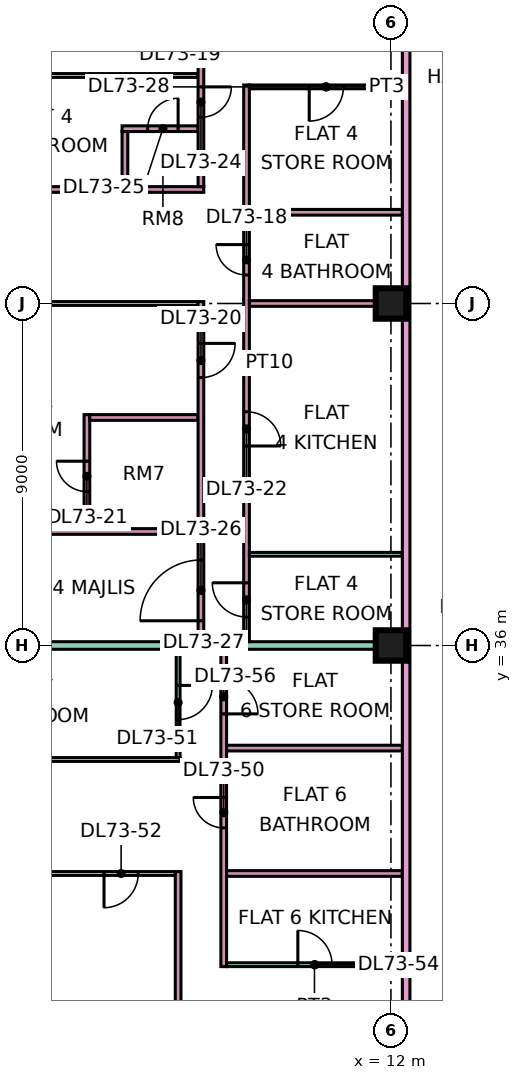
"""IFC4 building model, lengths in metres.
Left out: names, types, materials, properties, quantities, classifications, styles, units other than length and angle.
Written with IfcOpenShell. Run it as: python <this file> out.ifc"""

import sys

from ifc_helpers import new_model, si_unit, direction, frame, frame_2d, origin, origin_2d, place, context, subcontext, project, spatial, rectangle, extrude, element, fill, save


model = new_model("IFC4")
c1 = context("Model", 3, precision=1e-05, world=origin(), true_north=direction((0.0, 1.0)))
c2 = subcontext(c1, "Body", "Model", "MODEL_VIEW")
j1 = project(units=[si_unit("LENGTHUNIT", "METRE"), si_unit("PLANEANGLEUNIT", "RADIAN")], contexts=[c1])
p1 = place(None, origin())
s1 = spatial("IfcSite", under=j1, at=p1, CompositionType="ELEMENT")
p2 = place(p1, origin())
s2 = spatial("IfcBuilding", under=s1, at=p2, CompositionType="ELEMENT")
p3 = place(p2, frame((0.0, 0.0, 310.9)))
s3 = spatial("IfcBuildingStorey", under=s2, at=p3, CompositionType="ELEMENT", Elevation=310.9)
for number, where, z_axis, x_axis in (
    (1, (12.0, 36.0, 0.0), (0.0, 0.0, 1.0), (1.0, 0.0, 0.0)),
    (2, (12.0, 45.0, 0.0), (0.0, 0.0, 1.0), (1.0, 0.0, 0.0)),
):
    element("IfcColumn", number, at=place(p3, frame(where, z_axis=z_axis, x_axis=x_axis)), inside=s3, PredefinedType="COLUMN", context=c2, shape_type="SweptSolid", body=[
        extrude(rectangle(XDim=0.8, YDim=0.8, at=origin_2d()), origin(), (0.0, 0.0, 1.0), 3.75),
    ])
p4 = place(p3, frame((-1.351, 51.0, 0.0), z_axis=(0.0, 0.0, 1.0), x_axis=(1.0, 0.0, 0.0)))
e3 = element("IfcWall", 3, at=p4, inside=s3, PredefinedType="PARTITIONING", context=c2, shape_type="SweptSolid", body=[
    extrude(rectangle(XDim=8.276, YDim=0.1, at=frame_2d((4.138, 0.0))), origin(), (0.0, 0.0, 1.0), 3.35),
])
p5 = place(p3, frame((-1.35, 30.0, 0.0), z_axis=(0.0, 0.0, 1.0), x_axis=(1.0, 0.0, 0.0)))
e4 = element("IfcWall", 4, at=p5, inside=s3, PredefinedType="PARTITIONING", context=c2, shape_type="SweptSolid", body=[
    extrude(rectangle(XDim=7.675, YDim=0.1, at=frame_2d((3.837, 0.0))), origin(), (0.0, 0.0, 1.0), 3.35),
])
p6 = place(p5, frame((5.8, 0.0, 0.0)))
e5 = element("IfcOpeningElement", 5, at=p6, cuts=e4, PredefinedType="OPENING", context=c2, shape_type="SweptSolid", body=[
    extrude(rectangle(XDim=0.9, YDim=2.1, at=frame_2d((0.45, 1.05))), frame((0.0, 0.06, 0.0), z_axis=(0.0, -1.0, 0.0), x_axis=(1.0, 0.0, 0.0)), (0.0, 0.0, 1.0), 0.12),
])
p7 = place(p3, frame((-1.35, 33.0, 0.0), z_axis=(0.0, 0.0, 1.0), x_axis=(1.0, 0.0, 0.0)))
e6 = element("IfcWall", 6, at=p7, inside=s3, PredefinedType="PARTITIONING", context=c2, shape_type="SweptSolid", body=[
    extrude(rectangle(XDim=7.8, YDim=0.1, at=frame_2d((3.9, 0.0))), origin(), (0.0, 0.0, 1.0), 3.35),
])
p8 = place(p3, frame((0.0, 36.0, 0.0), z_axis=(0.0, 0.0, 1.0), x_axis=(1.0, 0.0, 0.0)))
e7 = element("IfcWall", 7, at=p8, inside=s3, PredefinedType="PARTITIONING", context=c2, shape_type="SweptSolid", body=[
    extrude(rectangle(XDim=12.3, YDim=0.2, at=frame_2d((6.15, 0.0))), origin(), (0.0, 0.0, 1.0), 3.35),
])
p9 = place(p3, frame((0.0, 48.0, 0.0), z_axis=(0.0, 0.0, 1.0), x_axis=(1.0, 0.0, 0.0)))
e8 = element("IfcWall", 8, at=p9, inside=s3, PredefinedType="PARTITIONING", context=c2, shape_type="SweptSolid", body=[
    extrude(rectangle(XDim=7.075, YDim=0.15, at=frame_2d((3.538, 0.0))), origin(), (0.0, 0.0, 1.0), 3.35),
])
p10 = place(p3, frame((0.074, 39.0, 0.0), z_axis=(0.0, 0.0, 1.0), x_axis=(1.0, 0.0, 0.0)))
e9 = element("IfcWall", 9, at=p10, inside=s3, PredefinedType="PARTITIONING", context=c2, shape_type="SweptSolid", body=[
    extrude(rectangle(XDim=6.851, YDim=0.15, at=frame_2d((3.426, 0.0))), origin(), (0.0, 0.0, 1.0), 3.35),
])
p11 = place(p3, frame((0.074, 45.0, 0.0), z_axis=(0.0, 0.0, 1.0), x_axis=(1.0, 0.0, 0.0)))
e10 = element("IfcWall", 10, at=p11, inside=s3, PredefinedType="PARTITIONING", context=c2, shape_type="SweptSolid", body=[
    extrude(rectangle(XDim=6.851, YDim=0.1, at=frame_2d((3.426, 0.0))), origin(), (0.0, 0.0, 1.0), 3.35),
])
p12 = place(p3, frame((4.0, 39.075, 0.0), z_axis=(0.0, 0.0, 1.0), x_axis=(0.0, 1.0, 0.0)))
e11 = element("IfcWall", 11, at=p12, inside=s3, PredefinedType="PARTITIONING", context=c2, shape_type="SweptSolid", body=[
    extrude(rectangle(XDim=3.0, YDim=0.15, at=frame_2d((1.5, 0.0))), origin(), (0.0, 0.0, 1.0), 3.35),
])
p13 = place(p12, frame((0.975, 0.0, 0.0)))
e12 = element("IfcOpeningElement", 12, at=p13, cuts=e11, PredefinedType="OPENING", context=c2, shape_type="SweptSolid", body=[
    extrude(rectangle(XDim=0.8, YDim=2.1, at=frame_2d((0.4, 1.05))), frame((0.0, 0.085, 0.0), z_axis=(0.0, -1.0, 0.0), x_axis=(1.0, 0.0, 0.0)), (0.0, 0.0, 1.0), 0.17),
])
p14 = place(p3, frame((4.075, 42.0, 0.0), z_axis=(0.0, 0.0, 1.0), x_axis=(1.0, 0.0, 0.0)))
e13 = element("IfcWall", 13, at=p14, inside=s3, PredefinedType="PARTITIONING", context=c2, shape_type="SweptSolid", body=[
    extrude(rectangle(XDim=2.85, YDim=0.15, at=frame_2d((1.425, 0.0))), origin(), (0.0, 0.0, 1.0), 3.35),
])
p15 = place(p3, frame((4.925, 49.6, 0.0), z_axis=(0.0, 0.0, 1.0), x_axis=(1.0, 0.0, 0.0)))
e14 = element("IfcWall", 14, at=p15, inside=s3, PredefinedType="PARTITIONING", context=c2, shape_type="SweptSolid", body=[
    extrude(rectangle(XDim=2.0, YDim=0.15, at=frame_2d((1.0, 0.0))), origin(), (0.0, 0.0, 1.0), 3.35),
])
p16 = place(p15, frame((0.675, 0.0, 0.0)))
e15 = element("IfcOpeningElement", 15, at=p16, cuts=e14, PredefinedType="OPENING", context=c2, shape_type="SweptSolid", body=[
    extrude(rectangle(XDim=0.8, YDim=2.1, at=frame_2d((0.4, 1.05))), frame((0.0, 0.085, 0.0), z_axis=(0.0, -1.0, 0.0), x_axis=(1.0, 0.0, 0.0)), (0.0, 0.0, 1.0), 0.17),
])
p17 = place(p3, frame((5.0, 48.075, 0.0), z_axis=(0.0, 0.0, 1.0), x_axis=(0.0, 1.0, 0.0)))
e16 = element("IfcWall", 16, at=p17, inside=s3, PredefinedType="PARTITIONING", context=c2, shape_type="SweptSolid", body=[
    extrude(rectangle(XDim=1.45, YDim=0.15, at=frame_2d((0.725, 0.0))), origin(), (0.0, 0.0, 1.0), 3.35),
])
p18 = place(p3, frame((6.4, 22.5, 0.0), z_axis=(0.0, 0.0, 1.0), x_axis=(0.0, 1.0, 0.0)))
e17 = element("IfcWall", 17, at=p18, inside=s3, PredefinedType="PARTITIONING", context=c2, shape_type="SweptSolid", body=[
    extrude(rectangle(XDim=7.55, YDim=0.15, at=frame_2d((3.775, 0.0))), origin(), (0.0, 0.0, 1.0), 3.35),
])
p19 = place(p3, frame((6.4, 33.05, 0.0), z_axis=(0.0, 0.0, 1.0), x_axis=(0.0, 1.0, 0.0)))
e18 = element("IfcWall", 18, at=p19, inside=s3, PredefinedType="PARTITIONING", context=c2, shape_type="SweptSolid", body=[
    extrude(rectangle(XDim=2.85, YDim=0.1, at=frame_2d((1.425, 0.0))), origin(), (0.0, 0.0, 1.0), 3.35),
])
p20 = place(p19, frame((1.0, 0.0, 0.0)))
e19 = element("IfcOpeningElement", 19, at=p20, cuts=e18, PredefinedType="OPENING", context=c2, shape_type="SweptSolid", body=[
    extrude(rectangle(XDim=0.9, YDim=2.1, at=frame_2d((0.45, 1.05))), frame((0.0, 0.06, 0.0), z_axis=(0.0, -1.0, 0.0), x_axis=(1.0, 0.0, 0.0)), (0.0, 0.0, 1.0), 0.12),
])
p21 = place(p3, frame((7.0, 36.1, 0.0), z_axis=(0.0, 0.0, 1.0), x_axis=(0.0, 1.0, 0.0)))
e20 = element("IfcWall", 20, at=p21, inside=s3, PredefinedType="PARTITIONING", context=c2, shape_type="SweptSolid", body=[
    extrude(rectangle(XDim=8.95, YDim=0.15, at=frame_2d((4.475, 0.0))), origin(), (0.0, 0.0, 1.0), 3.35),
])
p22 = place(p21, frame((6.95, 0.0, 0.0)))
e21 = element("IfcOpeningElement", 21, at=p22, cuts=e20, PredefinedType="OPENING", context=c2, shape_type="SweptSolid", body=[
    extrude(rectangle(XDim=0.9, YDim=2.1, at=frame_2d((0.45, 1.05))), frame((0.0, 0.085, 0.0), z_axis=(0.0, -1.0, 0.0), x_axis=(1.0, 0.0, 0.0)), (0.0, 0.0, 1.0), 0.17),
])
p23 = place(p21, frame((0.55, 0.0, 0.0)))
e22 = element("IfcOpeningElement", 22, at=p23, cuts=e20, PredefinedType="OPENING", context=c2, shape_type="SweptSolid", body=[
    extrude(rectangle(XDim=1.6, YDim=2.1, at=frame_2d((0.8, 1.05))), frame((0.0, 0.085, 0.0), z_axis=(0.0, -1.0, 0.0), x_axis=(1.0, 0.0, 0.0)), (0.0, 0.0, 1.0), 0.17),
])
p24 = place(p3, frame((7.0, 48.075, 0.0), z_axis=(0.0, 0.0, 1.0), x_axis=(0.0, 1.0, 0.0)))
e23 = element("IfcWall", 23, at=p24, inside=s3, PredefinedType="PARTITIONING", context=c2, shape_type="SweptSolid", body=[
    extrude(rectangle(XDim=7.275, YDim=0.15, at=frame_2d((3.638, 0.0))), origin(), (0.0, 0.0, 1.0), 3.35),
])
p25 = place(p24, frame((3.975, 0.0, 0.0)))
e24 = element("IfcOpeningElement", 24, at=p25, cuts=e23, PredefinedType="OPENING", context=c2, shape_type="SweptSolid", body=[
    extrude(rectangle(XDim=0.9, YDim=2.1, at=frame_2d((0.45, 1.05))), frame((0.0, 0.085, 0.0), z_axis=(0.0, -1.0, 0.0), x_axis=(1.0, 0.0, 0.0)), (0.0, 0.0, 1.0), 0.17),
])
p26 = place(p24, frame((1.825, 0.0, 0.0)))
e25 = element("IfcOpeningElement", 25, at=p26, cuts=e23, PredefinedType="OPENING", context=c2, shape_type="SweptSolid", body=[
    extrude(rectangle(XDim=0.8, YDim=2.1, at=frame_2d((0.4, 1.05))), frame((0.0, 0.085, 0.0), z_axis=(0.0, -1.0, 0.0), x_axis=(1.0, 0.0, 0.0)), (0.0, 0.0, 1.0), 0.17),
])
p27 = place(p3, frame((7.6, 27.55, 0.0), z_axis=(0.0, 0.0, 1.0), x_axis=(0.0, 1.0, 0.0)))
e26 = element("IfcWall", 26, at=p27, inside=s3, PredefinedType="PARTITIONING", context=c2, shape_type="SweptSolid", body=[
    extrude(rectangle(XDim=8.35, YDim=0.15, at=frame_2d((4.175, 0.0))), origin(), (0.0, 0.0, 1.0), 3.35),
])
p28 = place(p27, frame((3.65, 0.0, 0.0)))
e27 = element("IfcOpeningElement", 27, at=p28, cuts=e26, PredefinedType="OPENING", context=c2, shape_type="SweptSolid", body=[
    extrude(rectangle(XDim=0.8, YDim=2.1, at=frame_2d((0.4, 1.05))), frame((0.0, 0.085, 0.0), z_axis=(0.0, -1.0, 0.0), x_axis=(1.0, 0.0, 0.0)), (0.0, 0.0, 1.0), 0.17),
])
p29 = place(p27, frame((6.65, 0.0, 0.0)))
e28 = element("IfcOpeningElement", 28, at=p29, cuts=e26, PredefinedType="OPENING", context=c2, shape_type="SweptSolid", body=[
    extrude(rectangle(XDim=0.9, YDim=2.1, at=frame_2d((0.45, 1.05))), frame((0.0, 0.085, 0.0), z_axis=(0.0, -1.0, 0.0), x_axis=(1.0, 0.0, 0.0)), (0.0, 0.0, 1.0), 0.17),
])
p30 = place(p3, frame((7.675, 27.6, 0.0), z_axis=(0.0, 0.0, 1.0), x_axis=(1.0, 0.0, 0.0)))
e29 = element("IfcWall", 29, at=p30, inside=s3, PredefinedType="PARTITIONING", context=c2, shape_type="SweptSolid", body=[
    extrude(rectangle(XDim=4.625, YDim=0.1, at=frame_2d((2.312, 0.0))), origin(), (0.0, 0.0, 1.0), 3.35),
])
p31 = place(p30, frame((1.875, 0.0, 0.0)))
e30 = element("IfcOpeningElement", 30, at=p31, cuts=e29, PredefinedType="OPENING", context=c2, shape_type="SweptSolid", body=[
    extrude(rectangle(XDim=0.9, YDim=2.1, at=frame_2d((0.45, 1.05))), frame((0.0, 0.06, 0.0), z_axis=(0.0, -1.0, 0.0), x_axis=(1.0, 0.0, 0.0)), (0.0, 0.0, 1.0), 0.12),
])
for number, where, z_axis, x_axis in (
    (31, (7.675, 30.0, 0.0), (0.0, 0.0, 1.0), (1.0, 0.0, 0.0)),
    (32, (7.675, 33.3, 0.0), (0.0, 0.0, 1.0), (1.0, 0.0, 0.0)),
):
    element("IfcWall", number, at=place(p3, frame(where, z_axis=z_axis, x_axis=x_axis)), inside=s3, PredefinedType="PARTITIONING", context=c2, shape_type="SweptSolid", body=[
        extrude(rectangle(XDim=4.625, YDim=0.15, at=frame_2d((2.312, 0.0))), origin(), (0.0, 0.0, 1.0), 3.35),
    ])
p32 = place(p3, frame((8.2, 36.1, 0.0), z_axis=(0.0, 0.0, 1.0), x_axis=(0.0, 1.0, 0.0)))
e33 = element("IfcWall", 33, at=p32, inside=s3, PredefinedType="PARTITIONING", context=c2, shape_type="SweptSolid", body=[
    extrude(rectangle(XDim=14.65, YDim=0.15, at=frame_2d((7.325, 0.0))), origin(), (0.0, 0.0, 1.0), 3.35),
])
p33 = place(p32, frame((9.65, 0.0, 0.0)))
e34 = element("IfcOpeningElement", 34, at=p33, cuts=e33, PredefinedType="OPENING", context=c2, shape_type="SweptSolid", body=[
    extrude(rectangle(XDim=0.8, YDim=2.1, at=frame_2d((0.4, 1.05))), frame((0.0, 0.085, 0.0), z_axis=(0.0, -1.0, 0.0), x_axis=(1.0, 0.0, 0.0)), (0.0, 0.0, 1.0), 0.17),
])
p34 = place(p32, frame((5.15, 0.0, 0.0)))
e35 = element("IfcOpeningElement", 35, at=p34, cuts=e33, PredefinedType="OPENING", context=c2, shape_type="SweptSolid", body=[
    extrude(rectangle(XDim=0.9, YDim=2.1, at=frame_2d((0.45, 1.05))), frame((0.0, 0.085, 0.0), z_axis=(0.0, -1.0, 0.0), x_axis=(1.0, 0.0, 0.0)), (0.0, 0.0, 1.0), 0.17),
])
p35 = place(p32, frame((0.65, 0.0, 0.0)))
e36 = element("IfcOpeningElement", 36, at=p35, cuts=e33, PredefinedType="OPENING", context=c2, shape_type="SweptSolid", body=[
    extrude(rectangle(XDim=0.9, YDim=2.1, at=frame_2d((0.45, 1.05))), frame((0.0, 0.085, 0.0), z_axis=(0.0, -1.0, 0.0), x_axis=(1.0, 0.0, 0.0)), (0.0, 0.0, 1.0), 0.17),
])
p36 = place(p3, frame((8.275, 38.4, 0.0), z_axis=(0.0, 0.0, 1.0), x_axis=(1.0, 0.0, 0.0)))
e37 = element("IfcWall", 37, at=p36, inside=s3, PredefinedType="PARTITIONING", context=c2, shape_type="SweptSolid", body=[
    extrude(rectangle(XDim=4.025, YDim=0.1, at=frame_2d((2.013, 0.0))), origin(), (0.0, 0.0, 1.0), 3.35),
])
for number, where, z_axis, x_axis in (
    (38, (8.275, 45.0, 0.0), (0.0, 0.0, 1.0), (1.0, 0.0, 0.0)),
    (39, (8.275, 47.4, 0.0), (0.0, 0.0, 1.0), (1.0, 0.0, 0.0)),
):
    element("IfcWall", number, at=place(p3, frame(where, z_axis=z_axis, x_axis=x_axis)), inside=s3, PredefinedType="PARTITIONING", context=c2, shape_type="SweptSolid", body=[
        extrude(rectangle(XDim=4.025, YDim=0.15, at=frame_2d((2.013, 0.0))), origin(), (0.0, 0.0, 1.0), 3.35),
    ])
p37 = place(p3, frame((8.275, 50.7, 0.0), z_axis=(0.0, 0.0, 1.0), x_axis=(1.0, 0.0, 0.0)))
e40 = element("IfcWall", 40, at=p37, inside=s3, PredefinedType="PARTITIONING", context=c2, shape_type="SweptSolid", body=[
    extrude(rectangle(XDim=4.025, YDim=0.1, at=frame_2d((2.013, 0.0))), origin(), (0.0, 0.0, 1.0), 3.35),
])
p38 = place(p37, frame((1.575, 0.0, 0.0)))
e41 = element("IfcOpeningElement", 41, at=p38, cuts=e40, PredefinedType="OPENING", context=c2, shape_type="SweptSolid", body=[
    extrude(rectangle(XDim=0.9, YDim=2.1, at=frame_2d((0.45, 1.05))), frame((0.0, 0.06, 0.0), z_axis=(0.0, -1.0, 0.0), x_axis=(1.0, 0.0, 0.0)), (0.0, 0.0, 1.0), 0.12),
])
p39 = place(p3, frame((12.4, 20.0, 0.0), z_axis=(0.0, 0.0, 1.0), x_axis=(0.0, 1.0, 0.0)))
e42 = element("IfcWall", 42, at=p39, inside=s3, PredefinedType="PARTITIONING", context=c2, shape_type="SweptSolid", body=[
    extrude(rectangle(XDim=33.926, YDim=0.2, at=frame_2d((16.963, 0.0))), origin(), (0.0, 0.0, 1.0), 3.35),
])
p40 = place(p39, frame((31.8, 0.0, 0.0)))
e43 = element("IfcOpeningElement", 43, at=p40, cuts=e42, PredefinedType="OPENING", context=c2, shape_type="SweptSolid", body=[
    extrude(rectangle(XDim=1.0, YDim=2.1, at=frame_2d((0.5, 1.05))), frame((0.0, 0.11, 0.0), z_axis=(0.0, -1.0, 0.0), x_axis=(1.0, 0.0, 0.0)), (0.0, 0.0, 1.0), 0.22),
])
p41 = place(p39, frame((0.6, 0.0, 0.0)))
e44 = element("IfcOpeningElement", 44, at=p41, cuts=e42, PredefinedType="OPENING", context=c2, shape_type="SweptSolid", body=[
    extrude(rectangle(XDim=1.2, YDim=2.1, at=frame_2d((0.6, 1.05))), frame((0.0, 0.11, 0.0), z_axis=(0.0, -1.0, 0.0), x_axis=(1.0, 0.0, 0.0)), (0.0, 0.0, 1.0), 0.22),
])
p42 = place(p39, frame((4.5, 0.0, 0.0)))
e45 = element("IfcOpeningElement", 45, at=p42, cuts=e42, PredefinedType="OPENING", context=c2, shape_type="SweptSolid", body=[
    extrude(rectangle(XDim=1.0, YDim=2.1, at=frame_2d((0.5, 1.05))), frame((0.0, 0.11, 0.0), z_axis=(0.0, -1.0, 0.0), x_axis=(1.0, 0.0, 0.0)), (0.0, 0.0, 1.0), 0.22),
])
p43 = place(p33, frame((0.8, 0.0, 0.0), z_axis=(0.0, 0.0, 1.0), x_axis=(-1.0, 0.0, 0.0)))
e46 = element("IfcDoor", 46, at=p43, inside=s3, OperationType="SINGLE_SWING_RIGHT", PredefinedType="DOOR", context=c2, shape_type="SweptSolid", body=[
    extrude(rectangle(XDim=0.8, YDim=2.1, at=frame_2d((0.4, 1.05))), frame((0.0, 0.025, 0.0), z_axis=(0.0, -1.0, 0.0), x_axis=(1.0, 0.0, 0.0)), (0.0, 0.0, 1.0), 0.05),
])
fill(e34, e46)
p44 = place(p22, origin())
e47 = element("IfcDoor", 47, at=p44, inside=s3, OperationType="SINGLE_SWING_RIGHT", PredefinedType="DOOR", context=c2, shape_type="SweptSolid", body=[
    extrude(rectangle(XDim=0.9, YDim=2.1, at=frame_2d((0.45, 1.05))), frame((0.0, 0.025, 0.0), z_axis=(0.0, -1.0, 0.0), x_axis=(1.0, 0.0, 0.0)), (0.0, 0.0, 1.0), 0.05),
])
fill(e21, e47)
p45 = place(p13, frame((0.8, 0.0, 0.0), z_axis=(0.0, 0.0, 1.0), x_axis=(-1.0, 0.0, 0.0)))
e48 = element("IfcDoor", 48, at=p45, inside=s3, OperationType="SINGLE_SWING_RIGHT", PredefinedType="DOOR", context=c2, shape_type="SweptSolid", body=[
    extrude(rectangle(XDim=0.8, YDim=2.1, at=frame_2d((0.4, 1.05))), frame((0.0, 0.025, 0.0), z_axis=(0.0, -1.0, 0.0), x_axis=(1.0, 0.0, 0.0)), (0.0, 0.0, 1.0), 0.05),
])
fill(e12, e48)
p46 = place(p34, frame((0.9, 0.0, 0.0), z_axis=(0.0, 0.0, 1.0), x_axis=(-1.0, 0.0, 0.0)))
e49 = element("IfcDoor", 49, at=p46, inside=s3, OperationType="SINGLE_SWING_LEFT", PredefinedType="DOOR", context=c2, shape_type="SweptSolid", body=[
    extrude(rectangle(XDim=0.9, YDim=2.1, at=frame_2d((0.45, 1.05))), frame((0.0, 0.025, 0.0), z_axis=(0.0, -1.0, 0.0), x_axis=(1.0, 0.0, 0.0)), (0.0, 0.0, 1.0), 0.05),
])
fill(e35, e49)
p47 = place(p26, origin())
e50 = element("IfcDoor", 50, at=p47, inside=s3, OperationType="SINGLE_SWING_RIGHT", PredefinedType="DOOR", context=c2, shape_type="SweptSolid", body=[
    extrude(rectangle(XDim=0.8, YDim=2.1, at=frame_2d((0.4, 1.05))), frame((0.0, 0.025, 0.0), z_axis=(0.0, -1.0, 0.0), x_axis=(1.0, 0.0, 0.0)), (0.0, 0.0, 1.0), 0.05),
])
fill(e25, e50)
p48 = place(p16, frame((0.8, 0.0, 0.0), z_axis=(0.0, 0.0, 1.0), x_axis=(-1.0, 0.0, 0.0)))
e51 = element("IfcDoor", 51, at=p48, inside=s3, OperationType="SINGLE_SWING_RIGHT", PredefinedType="DOOR", context=c2, shape_type="SweptSolid", body=[
    extrude(rectangle(XDim=0.8, YDim=2.1, at=frame_2d((0.4, 1.05))), frame((0.0, 0.025, 0.0), z_axis=(0.0, -1.0, 0.0), x_axis=(1.0, 0.0, 0.0)), (0.0, 0.0, 1.0), 0.05),
])
fill(e15, e51)
p49 = place(p23, origin())
e52 = element("IfcDoor", 52, at=p49, inside=s3, OperationType="DOUBLE_DOOR_SINGLE_SWING", PredefinedType="DOOR", context=c2, shape_type="SweptSolid", body=[
    extrude(rectangle(XDim=1.6, YDim=2.1, at=frame_2d((0.8, 1.05))), frame((0.0, 0.025, 0.0), z_axis=(0.0, -1.0, 0.0), x_axis=(1.0, 0.0, 0.0)), (0.0, 0.0, 1.0), 0.05),
])
fill(e22, e52)
p50 = place(p35, frame((0.9, 0.0, 0.0), z_axis=(0.0, 0.0, 1.0), x_axis=(-1.0, 0.0, 0.0)))
e53 = element("IfcDoor", 53, at=p50, inside=s3, OperationType="SINGLE_SWING_RIGHT", PredefinedType="DOOR", context=c2, shape_type="SweptSolid", body=[
    extrude(rectangle(XDim=0.9, YDim=2.1, at=frame_2d((0.45, 1.05))), frame((0.0, 0.025, 0.0), z_axis=(0.0, -1.0, 0.0), x_axis=(1.0, 0.0, 0.0)), (0.0, 0.0, 1.0), 0.05),
])
fill(e36, e53)
p51 = place(p38, frame((0.9, 0.0, 0.0), z_axis=(0.0, 0.0, 1.0), x_axis=(-1.0, 0.0, 0.0)))
e54 = element("IfcDoor", 54, at=p51, inside=s3, OperationType="SINGLE_SWING_LEFT", PredefinedType="DOOR", context=c2, shape_type="SweptSolid", body=[
    extrude(rectangle(XDim=0.9, YDim=2.1, at=frame_2d((0.45, 1.05))), frame((0.0, 0.025, 0.0), z_axis=(0.0, -1.0, 0.0), x_axis=(1.0, 0.0, 0.0)), (0.0, 0.0, 1.0), 0.05),
])
fill(e41, e54)
p52 = place(p28, frame((0.8, 0.0, 0.0), z_axis=(0.0, 0.0, 1.0), x_axis=(-1.0, 0.0, 0.0)))
e55 = element("IfcDoor", 55, at=p52, inside=s3, OperationType="SINGLE_SWING_RIGHT", PredefinedType="DOOR", context=c2, shape_type="SweptSolid", body=[
    extrude(rectangle(XDim=0.8, YDim=2.1, at=frame_2d((0.4, 1.05))), frame((0.0, 0.025, 0.0), z_axis=(0.0, -1.0, 0.0), x_axis=(1.0, 0.0, 0.0)), (0.0, 0.0, 1.0), 0.05),
])
fill(e27, e55)
p53 = place(p20, origin())
e56 = element("IfcDoor", 56, at=p53, inside=s3, OperationType="SINGLE_SWING_RIGHT", PredefinedType="DOOR", context=c2, shape_type="SweptSolid", body=[
    extrude(rectangle(XDim=0.9, YDim=2.1, at=frame_2d((0.45, 1.05))), frame((0.0, 0.025, 0.0), z_axis=(0.0, -1.0, 0.0), x_axis=(1.0, 0.0, 0.0)), (0.0, 0.0, 1.0), 0.05),
])
fill(e19, e56)
p54 = place(p6, frame((0.9, 0.0, 0.0), z_axis=(0.0, 0.0, 1.0), x_axis=(-1.0, 0.0, 0.0)))
e57 = element("IfcDoor", 57, at=p54, inside=s3, OperationType="SINGLE_SWING_LEFT", PredefinedType="DOOR", context=c2, shape_type="SweptSolid", body=[
    extrude(rectangle(XDim=0.9, YDim=2.1, at=frame_2d((0.45, 1.05))), frame((0.0, 0.025, 0.0), z_axis=(0.0, -1.0, 0.0), x_axis=(1.0, 0.0, 0.0)), (0.0, 0.0, 1.0), 0.05),
])
fill(e5, e57)
p55 = place(p31, origin())
e58 = element("IfcDoor", 58, at=p55, inside=s3, OperationType="SINGLE_SWING_LEFT", PredefinedType="DOOR", context=c2, shape_type="SweptSolid", body=[
    extrude(rectangle(XDim=0.9, YDim=2.1, at=frame_2d((0.45, 1.05))), frame((0.0, 0.025, 0.0), z_axis=(0.0, -1.0, 0.0), x_axis=(1.0, 0.0, 0.0)), (0.0, 0.0, 1.0), 0.05),
])
fill(e30, e58)
p56 = place(p29, frame((0.9, 0.0, 0.0), z_axis=(0.0, 0.0, 1.0), x_axis=(-1.0, 0.0, 0.0)))
e59 = element("IfcDoor", 59, at=p56, inside=s3, OperationType="SINGLE_SWING_LEFT", PredefinedType="DOOR", context=c2, shape_type="SweptSolid", body=[
    extrude(rectangle(XDim=0.9, YDim=2.1, at=frame_2d((0.45, 1.05))), frame((0.0, 0.025, 0.0), z_axis=(0.0, -1.0, 0.0), x_axis=(1.0, 0.0, 0.0)), (0.0, 0.0, 1.0), 0.05),
])
fill(e28, e59)
save(model, sys.argv[1])
